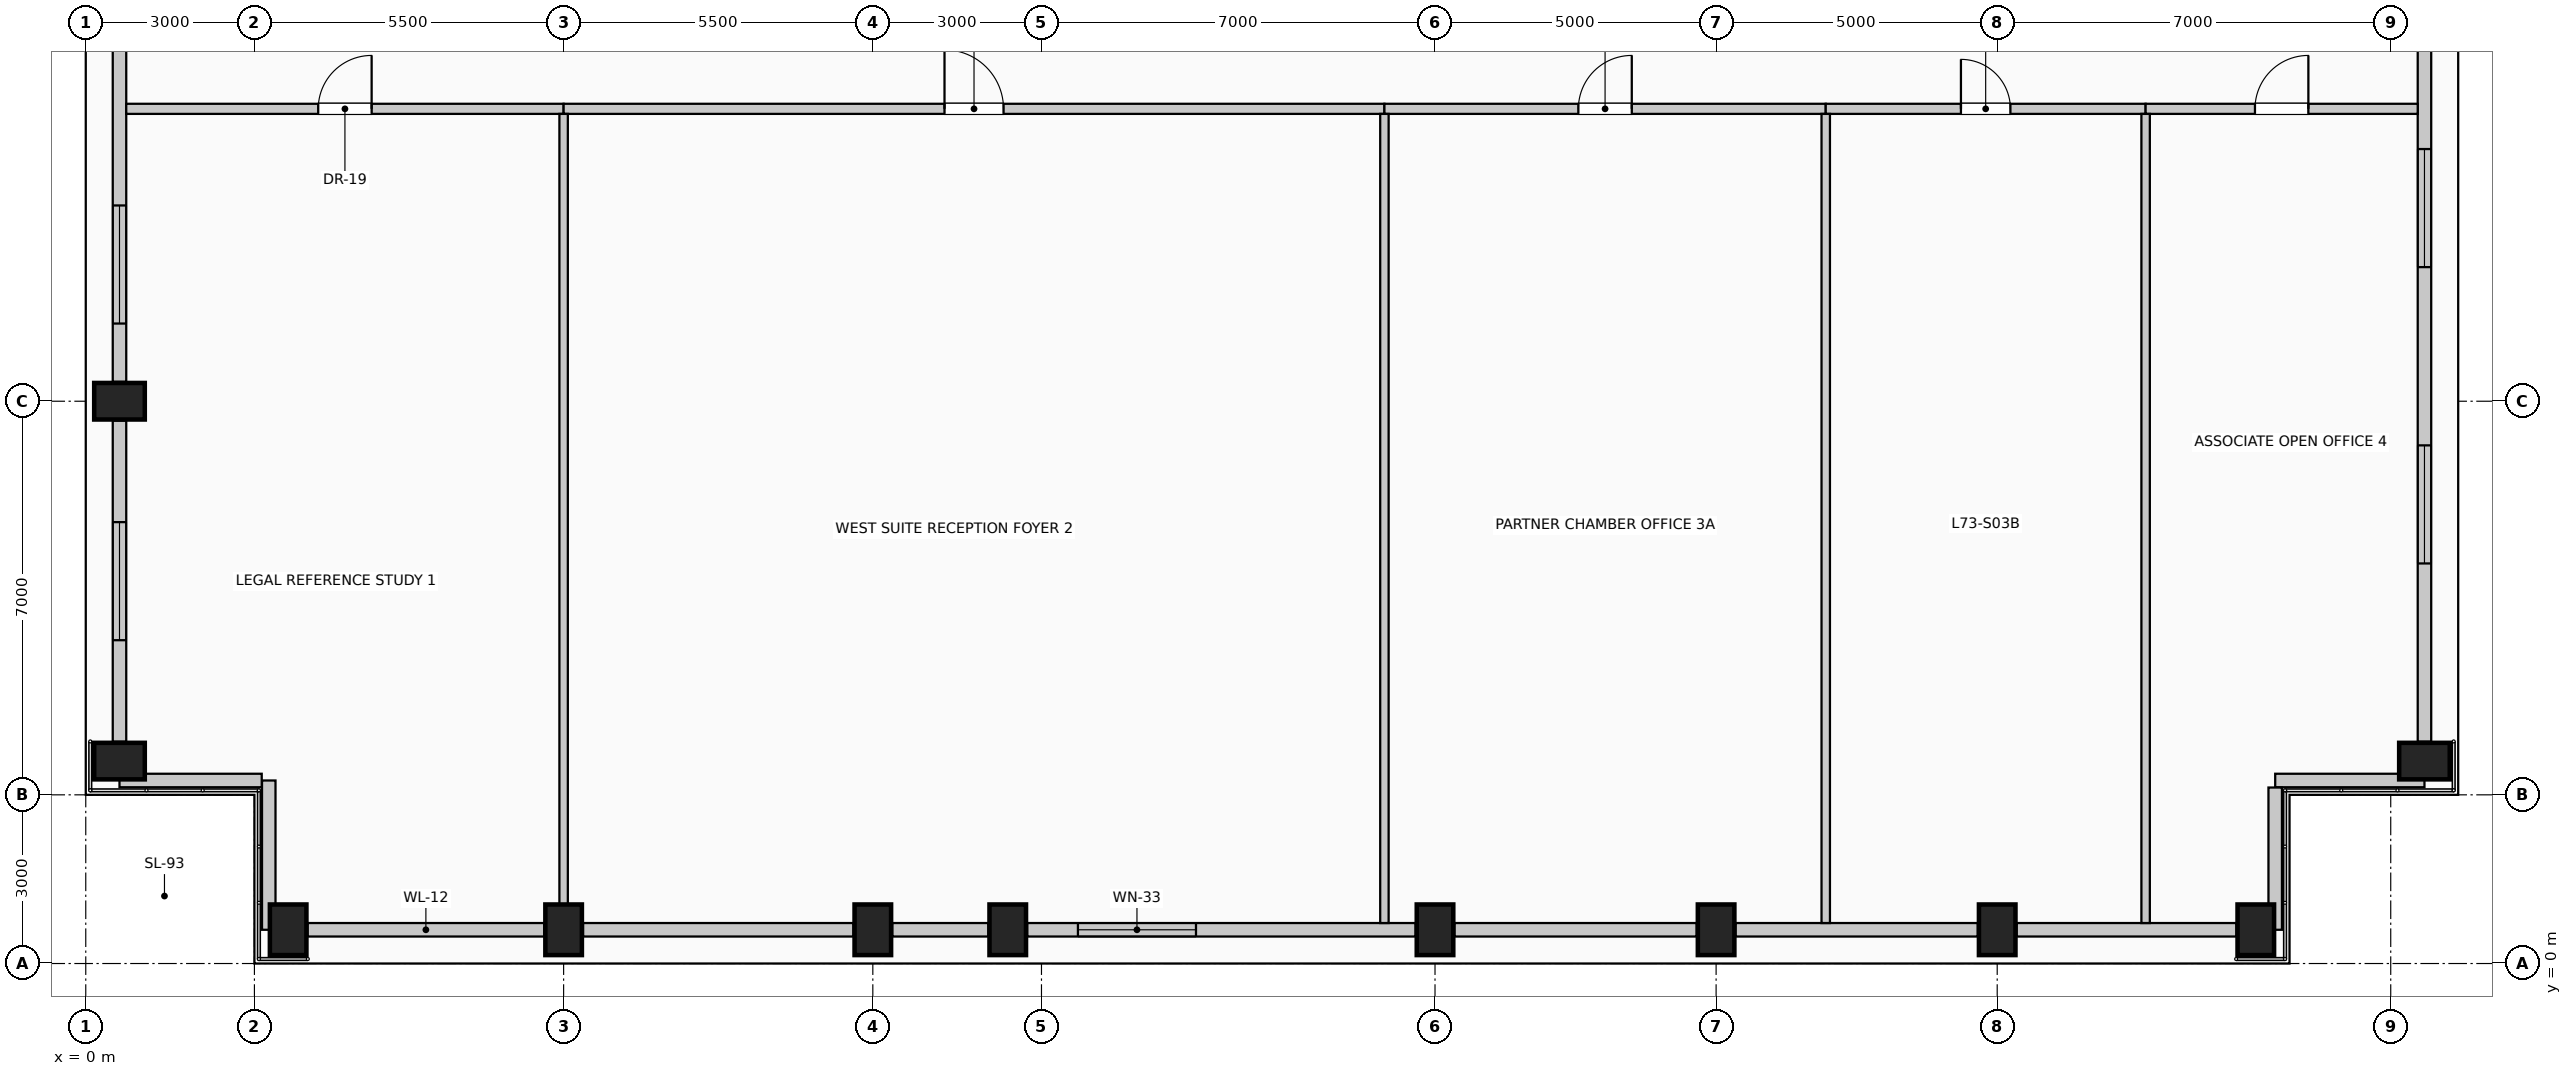
"""IFC4 building model, lengths in metres.
Left out: names, types, materials, properties, quantities, classifications, styles, units other than length and angle.
Written with IfcOpenShell. Run it as: python <this file> out.ifc"""

import sys

from ifc_helpers import new_model, si_unit, direction, frame, frame_2d, origin, origin_2d, place, context, subcontext, project, spatial, rectangle, extrude, element, fill, save


model = new_model("IFC4")
c1 = context("Model", 3, precision=1e-05, world=origin(), true_north=direction((0.0, 1.0)))
c2 = subcontext(c1, "Body", "Model", "MODEL_VIEW")
j1 = project(units=[si_unit("LENGTHUNIT", "METRE"), si_unit("PLANEANGLEUNIT", "RADIAN")], contexts=[c1])
p1 = place(None, origin())
s1 = spatial("IfcSite", under=j1, at=p1, CompositionType="ELEMENT")
p2 = place(p1, origin())
s2 = spatial("IfcBuilding", under=s1, at=p2, CompositionType="ELEMENT")
p3 = place(p2, frame((0.0, 0.0, 301.0)))
s3 = spatial("IfcBuildingStorey", under=s2, at=p3, CompositionType="ELEMENT", Elevation=301.0)
for number, where, z_axis, x_axis in (
    (1, (3.6, 0.6, 0.0), (0.0, 0.0, 1.0), (1.0, 0.0, 0.0)),
    (2, (8.5, 0.6, 0.0), (0.0, 0.0, 1.0), (1.0, 0.0, 0.0)),
    (3, (14.0, 0.6, 0.0), (0.0, 0.0, 1.0), (1.0, 0.0, 0.0)),
    (4, (16.4, 0.6, 0.0), (0.0, 0.0, 1.0), (1.0, 0.0, 0.0)),
    (5, (24.0, 0.6, 0.0), (0.0, 0.0, 1.0), (1.0, 0.0, 0.0)),
    (6, (29.0, 0.6, 0.0), (0.0, 0.0, 1.0), (1.0, 0.0, 0.0)),
    (7, (34.0, 0.6, 0.0), (0.0, 0.0, 1.0), (1.0, 0.0, 0.0)),
    (8, (38.6, 0.6, 0.0), (0.0, 0.0, 1.0), (1.0, 0.0, 0.0)),
    (9, (0.6, 3.6, 0.0), (0.0, 0.0, 1.0), (0.0, 1.0, 0.0)),
    (10, (41.6, 3.6, 0.0), (0.0, 0.0, 1.0), (0.0, 1.0, 0.0)),
    (11, (0.6, 10.0, 0.0), (0.0, 0.0, 1.0), (0.0, 1.0, 0.0)),
):
    element("IfcColumn", number, at=place(p3, frame(where, z_axis=z_axis, x_axis=x_axis)), inside=s3, PredefinedType="COLUMN", context=c2, shape_type="SweptSolid", body=[
        extrude(rectangle(XDim=0.65, YDim=0.9, at=origin_2d()), origin(), (0.0, 0.0, 1.0), 4.0),
    ])
p4 = place(p3, frame((8.155, 0.6, 0.0), z_axis=(0.0, 0.0, 1.0), x_axis=(-1.0, 0.0, 0.0)))
e12 = element("IfcWall", 12, at=p4, inside=s3, PredefinedType="SOLIDWALL", context=c2, shape_type="SweptSolid", body=[
    extrude(rectangle(XDim=4.21, YDim=0.24, at=frame_2d((2.105, 0.0))), origin(), (0.0, 0.0, 1.0), 3.025),
])
p5 = place(p3, frame((13.655, 0.6, 0.0), z_axis=(0.0, 0.0, 1.0), x_axis=(-1.0, 0.0, 0.0)))
e13 = element("IfcWall", 13, at=p5, inside=s3, PredefinedType="SOLIDWALL", context=c2, shape_type="SweptSolid", body=[
    extrude(rectangle(XDim=4.81, YDim=0.24, at=frame_2d((2.405, 0.0))), origin(), (0.0, 0.0, 1.0), 3.025),
])
p6 = place(p3, frame((16.055, 0.6, 0.0), z_axis=(0.0, 0.0, 1.0), x_axis=(-1.0, 0.0, 0.0)))
e14 = element("IfcWall", 14, at=p6, inside=s3, PredefinedType="SOLIDWALL", context=c2, shape_type="SweptSolid", body=[
    extrude(rectangle(XDim=1.71, YDim=0.24, at=frame_2d((0.855, 0.0))), origin(), (0.0, 0.0, 1.0), 3.025),
])
p7 = place(p3, frame((23.655, 0.6, 0.0), z_axis=(0.0, 0.0, 1.0), x_axis=(-1.0, 0.0, 0.0)))
e15 = element("IfcWall", 15, at=p7, inside=s3, PredefinedType="SOLIDWALL", context=c2, shape_type="SweptSolid", body=[
    extrude(rectangle(XDim=6.91, YDim=0.24, at=frame_2d((3.455, 0.0))), origin(), (0.0, 0.0, 1.0), 3.025),
])
p8 = place(p7, frame((3.907, 0.0, 0.35)))
e16 = element("IfcOpeningElement", 16, at=p8, cuts=e15, PredefinedType="OPENING", context=c2, shape_type="SweptSolid", body=[
    extrude(rectangle(XDim=2.1, YDim=2.2, at=frame_2d((1.05, 1.1))), frame((0.0, 0.13, 0.0), z_axis=(0.0, -1.0, 0.0), x_axis=(1.0, 0.0, 0.0)), (0.0, 0.0, 1.0), 0.26),
])
p9 = place(p3, frame((28.655, 0.6, 0.0), z_axis=(0.0, 0.0, 1.0), x_axis=(-1.0, 0.0, 0.0)))
e17 = element("IfcWall", 17, at=p9, inside=s3, PredefinedType="SOLIDWALL", context=c2, shape_type="SweptSolid", body=[
    extrude(rectangle(XDim=4.31, YDim=0.24, at=frame_2d((2.155, 0.0))), origin(), (0.0, 0.0, 1.0), 2.175),
])
p10 = place(p3, frame((33.655, 0.6, 0.0), z_axis=(0.0, 0.0, 1.0), x_axis=(-1.0, 0.0, 0.0)))
e18 = element("IfcWall", 18, at=p10, inside=s3, PredefinedType="SOLIDWALL", context=c2, shape_type="SweptSolid", body=[
    extrude(rectangle(XDim=4.31, YDim=0.24, at=frame_2d((2.155, 0.0))), origin(), (0.0, 0.0, 1.0), 2.165),
])
p11 = place(p3, frame((38.255, 0.6, 0.0), z_axis=(0.0, 0.0, 1.0), x_axis=(-1.0, 0.0, 0.0)))
e19 = element("IfcWall", 19, at=p11, inside=s3, PredefinedType="SOLIDWALL", context=c2, shape_type="SweptSolid", body=[
    extrude(rectangle(XDim=3.91, YDim=0.24, at=frame_2d((1.955, 0.0))), origin(), (0.0, 0.0, 1.0), 2.165),
])
p12 = place(p3, frame((0.6, 3.945, 0.0), z_axis=(0.0, 0.0, 1.0), x_axis=(0.0, 1.0, 0.0)))
e20 = element("IfcWall", 20, at=p12, inside=s3, PredefinedType="SOLIDWALL", context=c2, shape_type="SweptSolid", body=[
    extrude(rectangle(XDim=5.71, YDim=0.24, at=frame_2d((2.855, 0.0))), origin(), (0.0, 0.0, 1.0), 3.025),
])
p13 = place(p12, frame((1.805, 0.0, 0.35)))
e21 = element("IfcOpeningElement", 21, at=p13, cuts=e20, PredefinedType="OPENING", context=c2, shape_type="SweptSolid", body=[
    extrude(rectangle(XDim=2.1, YDim=2.2, at=frame_2d((1.05, 1.1))), frame((0.0, 0.13, 0.0), z_axis=(0.0, -1.0, 0.0), x_axis=(1.0, 0.0, 0.0)), (0.0, 0.0, 1.0), 0.26),
])
p14 = place(p3, frame((0.6, 10.345, 0.0), z_axis=(0.0, 0.0, 1.0), x_axis=(0.0, 1.0, 0.0)))
e22 = element("IfcWall", 22, at=p14, inside=s3, PredefinedType="SOLIDWALL", context=c2, shape_type="SweptSolid", body=[
    extrude(rectangle(XDim=7.31, YDim=0.24, at=frame_2d((3.655, 0.0))), origin(), (0.0, 0.0, 1.0), 3.025),
])
p15 = place(p14, frame((1.037, 0.0, 0.35)))
e23 = element("IfcOpeningElement", 23, at=p15, cuts=e22, PredefinedType="OPENING", context=c2, shape_type="SweptSolid", body=[
    extrude(rectangle(XDim=2.1, YDim=2.2, at=frame_2d((1.05, 1.1))), frame((0.0, 0.13, 0.0), z_axis=(0.0, -1.0, 0.0), x_axis=(1.0, 0.0, 0.0)), (0.0, 0.0, 1.0), 0.26),
])
p16 = place(p3, frame((41.6, 17.655, 0.0), z_axis=(0.0, 0.0, 1.0), x_axis=(0.0, -1.0, 0.0)))
e24 = element("IfcWall", 24, at=p16, inside=s3, PredefinedType="SOLIDWALL", context=c2, shape_type="SweptSolid", body=[
    extrude(rectangle(XDim=13.71, YDim=0.24, at=frame_2d((6.855, 0.0))), origin(), (0.0, 0.0, 1.0), 3.015),
])
p17 = place(p16, frame((3.17, 0.0, 0.35)))
e25 = element("IfcOpeningElement", 25, at=p17, cuts=e24, PredefinedType="OPENING", context=c2, shape_type="SweptSolid", body=[
    extrude(rectangle(XDim=2.1, YDim=2.2, at=frame_2d((1.05, 1.1))), frame((0.0, 0.13, 0.0), z_axis=(0.0, -1.0, 0.0), x_axis=(1.0, 0.0, 0.0)), (0.0, 0.0, 1.0), 0.26),
])
p18 = place(p16, frame((8.44, 0.0, 0.35)))
e26 = element("IfcOpeningElement", 26, at=p18, cuts=e24, PredefinedType="OPENING", context=c2, shape_type="SweptSolid", body=[
    extrude(rectangle(XDim=2.1, YDim=2.2, at=frame_2d((1.05, 1.1))), frame((0.0, 0.13, 0.0), z_axis=(0.0, -1.0, 0.0), x_axis=(1.0, 0.0, 0.0)), (0.0, 0.0, 1.0), 0.26),
])
p19 = place(p3, frame((41.6, 3.255, 0.0), z_axis=(0.0, 0.0, 1.0), x_axis=(-1.0, 0.0, 0.0)))
e27 = element("IfcWall", 27, at=p19, inside=s3, PredefinedType="SOLIDWALL", context=c2, shape_type="SweptSolid", body=[
    extrude(rectangle(XDim=2.655, YDim=0.24, at=frame_2d((1.328, 0.0))), origin(), (0.0, 0.0, 1.0), 2.165),
])
p20 = place(p3, frame((38.945, 3.13, 0.0), z_axis=(0.0, 0.0, 1.0), x_axis=(0.0, -1.0, 0.0)))
e28 = element("IfcWall", 28, at=p20, inside=s3, PredefinedType="SOLIDWALL", context=c2, shape_type="SweptSolid", body=[
    extrude(rectangle(XDim=2.53, YDim=0.24, at=frame_2d((1.265, 0.0))), origin(), (0.0, 0.0, 1.0), 2.165),
])
p21 = place(p3, frame((3.255, 0.6, 0.0), z_axis=(0.0, 0.0, 1.0), x_axis=(0.0, 1.0, 0.0)))
e29 = element("IfcWall", 29, at=p21, inside=s3, PredefinedType="SOLIDWALL", context=c2, shape_type="SweptSolid", body=[
    extrude(rectangle(XDim=2.655, YDim=0.24, at=frame_2d((1.327, 0.0))), origin(), (0.0, 0.0, 1.0), 3.775),
])
p22 = place(p3, frame((3.13, 3.255, 0.0), z_axis=(0.0, 0.0, 1.0), x_axis=(-1.0, 0.0, 0.0)))
e30 = element("IfcWall", 30, at=p22, inside=s3, PredefinedType="SOLIDWALL", context=c2, shape_type="SweptSolid", body=[
    extrude(rectangle(XDim=2.53, YDim=0.24, at=frame_2d((1.265, 0.0))), origin(), (0.0, 0.0, 1.0), 3.775),
])
p23 = place(p3, frame((0.72, 15.2, 0.0), z_axis=(0.0, 0.0, 1.0), x_axis=(1.0, 0.0, 0.0)))
e31 = element("IfcWall", 31, at=p23, inside=s3, PredefinedType="PARTITIONING", context=c2, shape_type="SweptSolid", body=[
    extrude(rectangle(XDim=7.78, YDim=0.18, at=frame_2d((3.89, 0.0))), origin(), (0.0, 0.0, 1.0), 3.775),
])
p24 = place(p23, frame((3.415, 0.0, 0.0)))
e32 = element("IfcOpeningElement", 32, at=p24, cuts=e31, PredefinedType="OPENING", context=c2, shape_type="SweptSolid", body=[
    extrude(rectangle(XDim=0.95, YDim=2.15, at=frame_2d((0.475, 1.075))), frame((0.0, 0.1, 0.0), z_axis=(0.0, -1.0, 0.0), x_axis=(1.0, 0.0, 0.0)), (0.0, 0.0, 1.0), 0.2),
])
p25 = place(p3, frame((8.5, 15.2, 0.0), z_axis=(0.0, 0.0, 1.0), x_axis=(1.0, 0.0, 0.0)))
e33 = element("IfcWall", 33, at=p25, inside=s3, PredefinedType="PARTITIONING", context=c2, shape_type="SweptSolid", body=[
    extrude(rectangle(XDim=14.6, YDim=0.18, at=frame_2d((7.3, 0.0))), origin(), (0.0, 0.0, 1.0), 3.775),
])
p26 = place(p25, frame((6.775, 0.0, 0.0)))
e34 = element("IfcOpeningElement", 34, at=p26, cuts=e33, PredefinedType="OPENING", context=c2, shape_type="SweptSolid", body=[
    extrude(rectangle(XDim=1.05, YDim=2.15, at=frame_2d((0.525, 1.075))), frame((0.0, 0.1, 0.0), z_axis=(0.0, -1.0, 0.0), x_axis=(1.0, 0.0, 0.0)), (0.0, 0.0, 1.0), 0.2),
])
p27 = place(p3, frame((23.1, 15.2, 0.0), z_axis=(0.0, 0.0, 1.0), x_axis=(1.0, 0.0, 0.0)))
e35 = element("IfcWall", 35, at=p27, inside=s3, PredefinedType="PARTITIONING", context=c2, shape_type="SweptSolid", body=[
    extrude(rectangle(XDim=7.85, YDim=0.18, at=frame_2d((3.925, 0.0))), origin(), (0.0, 0.0, 1.0), 3.775),
])
p28 = place(p27, frame((3.45, 0.0, 0.0)))
e36 = element("IfcOpeningElement", 36, at=p28, cuts=e35, PredefinedType="OPENING", context=c2, shape_type="SweptSolid", body=[
    extrude(rectangle(XDim=0.95, YDim=2.15, at=frame_2d((0.475, 1.075))), frame((0.0, 0.1, 0.0), z_axis=(0.0, -1.0, 0.0), x_axis=(1.0, 0.0, 0.0)), (0.0, 0.0, 1.0), 0.2),
])
p29 = place(p3, frame((30.95, 15.2, 0.0), z_axis=(0.0, 0.0, 1.0), x_axis=(1.0, 0.0, 0.0)))
e37 = element("IfcWall", 37, at=p29, inside=s3, PredefinedType="PARTITIONING", context=c2, shape_type="SweptSolid", body=[
    extrude(rectangle(XDim=5.69, YDim=0.18, at=frame_2d((2.845, 0.0))), origin(), (0.0, 0.0, 1.0), 3.775),
])
p30 = place(p29, frame((2.405, 0.0, 0.0)))
e38 = element("IfcOpeningElement", 38, at=p30, cuts=e37, PredefinedType="OPENING", context=c2, shape_type="SweptSolid", body=[
    extrude(rectangle(XDim=0.88, YDim=2.1, at=frame_2d((0.44, 1.05))), frame((0.0, 0.1, 0.0), z_axis=(0.0, -1.0, 0.0), x_axis=(1.0, 0.0, 0.0)), (0.0, 0.0, 1.0), 0.2),
])
p31 = place(p3, frame((36.64, 15.2, 0.0), z_axis=(0.0, 0.0, 1.0), x_axis=(1.0, 0.0, 0.0)))
e39 = element("IfcWall", 39, at=p31, inside=s3, PredefinedType="PARTITIONING", context=c2, shape_type="SweptSolid", body=[
    extrude(rectangle(XDim=4.84, YDim=0.18, at=frame_2d((2.42, 0.0))), origin(), (0.0, 0.0, 1.0), 3.775),
])
p32 = place(p31, frame((1.945, 0.0, 0.0)))
e40 = element("IfcOpeningElement", 40, at=p32, cuts=e39, PredefinedType="OPENING", context=c2, shape_type="SweptSolid", body=[
    extrude(rectangle(XDim=0.95, YDim=2.15, at=frame_2d((0.475, 1.075))), frame((0.0, 0.1, 0.0), z_axis=(0.0, -1.0, 0.0), x_axis=(1.0, 0.0, 0.0)), (0.0, 0.0, 1.0), 0.2),
])
p33 = place(p3, frame((8.5, 1.05, 0.0), z_axis=(0.0, 0.0, 1.0), x_axis=(0.0, 1.0, 0.0)))
e41 = element("IfcWall", 41, at=p33, inside=s3, PredefinedType="PARTITIONING", context=c2, shape_type="SweptSolid", body=[
    extrude(rectangle(XDim=14.06, YDim=0.15, at=frame_2d((7.03, 0.0))), origin(), (0.0, 0.0, 1.0), 3.775),
])
for number, where, z_axis, x_axis in (
    (42, (23.1, 0.72, 0.0), (0.0, 0.0, 1.0), (0.0, 1.0, 0.0)),
    (43, (30.95, 0.72, 0.0), (0.0, 0.0, 1.0), (0.0, 1.0, 0.0)),
    (44, (36.64, 0.72, 0.0), (0.0, 0.0, 1.0), (0.0, 1.0, 0.0)),
):
    element("IfcWall", number, at=place(p3, frame(where, z_axis=z_axis, x_axis=x_axis)), inside=s3, PredefinedType="PARTITIONING", context=c2, shape_type="SweptSolid", body=[
        extrude(rectangle(XDim=14.39, YDim=0.15, at=frame_2d((7.195, 0.0))), origin(), (0.0, 0.0, 1.0), 3.775),
    ])
p34 = place(p8, origin())
e45 = element("IfcWindow", 45, at=p34, inside=s3, PartitioningType="SINGLE_PANEL", PredefinedType="WINDOW", context=c2, shape_type="SweptSolid", body=[
    extrude(rectangle(XDim=2.1, YDim=2.2, at=frame_2d((1.05, 1.1))), frame((0.0, 0.03, 0.0), z_axis=(0.0, -1.0, 0.0), x_axis=(1.0, 0.0, 0.0)), (0.0, 0.0, 1.0), 0.06),
])
fill(e16, e45)
p35 = place(p13, origin())
e46 = element("IfcWindow", 46, at=p35, inside=s3, PartitioningType="SINGLE_PANEL", PredefinedType="WINDOW", context=c2, shape_type="SweptSolid", body=[
    extrude(rectangle(XDim=2.1, YDim=2.2, at=frame_2d((1.05, 1.1))), frame((0.0, 0.03, 0.0), z_axis=(0.0, -1.0, 0.0), x_axis=(1.0, 0.0, 0.0)), (0.0, 0.0, 1.0), 0.06),
])
fill(e21, e46)
p36 = place(p15, origin())
e47 = element("IfcWindow", 47, at=p36, inside=s3, PartitioningType="SINGLE_PANEL", PredefinedType="WINDOW", context=c2, shape_type="SweptSolid", body=[
    extrude(rectangle(XDim=2.1, YDim=2.2, at=frame_2d((1.05, 1.1))), frame((0.0, 0.03, 0.0), z_axis=(0.0, -1.0, 0.0), x_axis=(1.0, 0.0, 0.0)), (0.0, 0.0, 1.0), 0.06),
])
fill(e23, e47)
p37 = place(p17, origin())
e48 = element("IfcWindow", 48, at=p37, inside=s3, PartitioningType="SINGLE_PANEL", PredefinedType="WINDOW", context=c2, shape_type="SweptSolid", body=[
    extrude(rectangle(XDim=2.1, YDim=2.2, at=frame_2d((1.05, 1.1))), frame((0.0, 0.03, 0.0), z_axis=(0.0, -1.0, 0.0), x_axis=(1.0, 0.0, 0.0)), (0.0, 0.0, 1.0), 0.06),
])
fill(e25, e48)
p38 = place(p18, origin())
e49 = element("IfcWindow", 49, at=p38, inside=s3, PartitioningType="SINGLE_PANEL", PredefinedType="WINDOW", context=c2, shape_type="SweptSolid", body=[
    extrude(rectangle(XDim=2.1, YDim=2.2, at=frame_2d((1.05, 1.1))), frame((0.0, 0.03, 0.0), z_axis=(0.0, -1.0, 0.0), x_axis=(1.0, 0.0, 0.0)), (0.0, 0.0, 1.0), 0.06),
])
fill(e26, e49)
p39 = place(p24, origin())
e50 = element("IfcDoor", 50, at=p39, inside=s3, OperationType="SINGLE_SWING_RIGHT", PredefinedType="DOOR", context=c2, shape_type="SweptSolid", body=[
    extrude(rectangle(XDim=0.95, YDim=2.15, at=frame_2d((0.475, 1.075))), frame((0.0, 0.025, 0.0), z_axis=(0.0, -1.0, 0.0), x_axis=(1.0, 0.0, 0.0)), (0.0, 0.0, 1.0), 0.05),
])
fill(e32, e50)
p40 = place(p26, origin())
e51 = element("IfcDoor", 51, at=p40, inside=s3, OperationType="SINGLE_SWING_LEFT", PredefinedType="DOOR", context=c2, shape_type="SweptSolid", body=[
    extrude(rectangle(XDim=1.05, YDim=2.15, at=frame_2d((0.525, 1.075))), frame((0.0, 0.025, 0.0), z_axis=(0.0, -1.0, 0.0), x_axis=(1.0, 0.0, 0.0)), (0.0, 0.0, 1.0), 0.05),
])
fill(e34, e51)
p41 = place(p28, origin())
e52 = element("IfcDoor", 52, at=p41, inside=s3, OperationType="SINGLE_SWING_RIGHT", PredefinedType="DOOR", context=c2, shape_type="SweptSolid", body=[
    extrude(rectangle(XDim=0.95, YDim=2.15, at=frame_2d((0.475, 1.075))), frame((0.0, 0.025, 0.0), z_axis=(0.0, -1.0, 0.0), x_axis=(1.0, 0.0, 0.0)), (0.0, 0.0, 1.0), 0.05),
])
fill(e36, e52)
p42 = place(p30, origin())
e53 = element("IfcDoor", 53, at=p42, inside=s3, OperationType="SINGLE_SWING_LEFT", PredefinedType="DOOR", context=c2, shape_type="SweptSolid", body=[
    extrude(rectangle(XDim=0.88, YDim=2.1, at=frame_2d((0.44, 1.05))), frame((0.0, 0.025, 0.0), z_axis=(0.0, -1.0, 0.0), x_axis=(1.0, 0.0, 0.0)), (0.0, 0.0, 1.0), 0.05),
])
fill(e38, e53)
p43 = place(p32, origin())
e54 = element("IfcDoor", 54, at=p43, inside=s3, OperationType="SINGLE_SWING_RIGHT", PredefinedType="DOOR", context=c2, shape_type="SweptSolid", body=[
    extrude(rectangle(XDim=0.95, YDim=2.15, at=frame_2d((0.475, 1.075))), frame((0.0, 0.025, 0.0), z_axis=(0.0, -1.0, 0.0), x_axis=(1.0, 0.0, 0.0)), (0.0, 0.0, 1.0), 0.05),
])
fill(e40, e54)
save(model, sys.argv[1])
